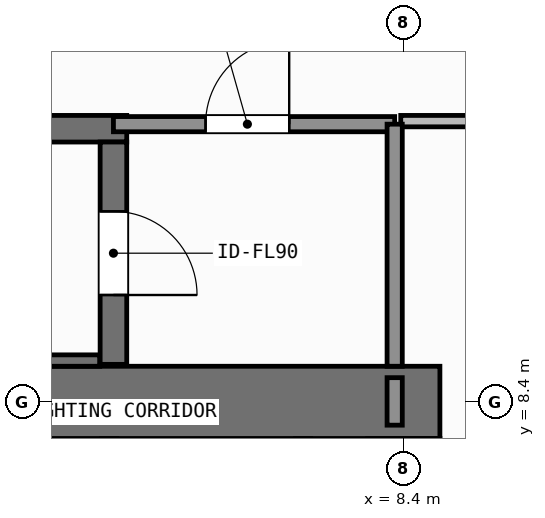
"""IFC4 building model, lengths in metres.
Left out: names, types, materials, properties, quantities, classifications, styles, units other than length and angle.
Written with IfcOpenShell. Run it as: python <this file> out.ifc"""

import sys

from ifc_helpers import new_model, si_unit, direction, frame, frame_2d, origin, place, context, subcontext, project, spatial, rectangle, extrude, element, fill, save


model = new_model("IFC4")
c1 = context("Model", 3, precision=1e-05, world=origin(), true_north=direction((0.0, 1.0)))
c2 = subcontext(c1, "Body", "Model", "MODEL_VIEW")
j1 = project(units=[si_unit("LENGTHUNIT", "METRE"), si_unit("PLANEANGLEUNIT", "RADIAN")], contexts=[c1])
p1 = place(None, origin())
s1 = spatial("IfcSite", under=j1, at=p1, CompositionType="ELEMENT")
p2 = place(p1, origin())
s2 = spatial("IfcBuilding", under=s1, at=p2, CompositionType="ELEMENT")
p3 = place(p2, frame((0.0, 0.0, 93.0)))
s3 = spatial("IfcBuildingStorey", under=s2, at=p3, CompositionType="ELEMENT", Elevation=93.0)
p4 = place(p3, frame((-7.55, 8.4, 0.0), z_axis=(0.0, 0.0, 1.0), x_axis=(1.0, 0.0, 0.0)))
e1 = element("IfcWall", 1, at=p4, inside=s3, PredefinedType="SHEAR", context=c2, shape_type="SweptSolid", body=[
    extrude(rectangle(XDim=16.425, YDim=0.95, at=frame_2d((8.212, 0.0))), origin(), (0.0, 0.0, 1.0), 3.9),
])
p5 = place(p3, frame((8.4, 5.825, 0.0), z_axis=(0.0, 0.0, 1.0), x_axis=(0.0, 1.0, 0.0)))
e2 = element("IfcWall", 2, at=p5, inside=s3, PredefinedType="SHEAR", context=c2, shape_type="SweptSolid", body=[
    extrude(rectangle(XDim=2.1, YDim=0.95, at=frame_2d((1.05, 0.0))), origin(), (0.0, 0.0, 1.0), 3.9),
])
p6 = place(p3, frame((-2.555, 12.0, 0.0), z_axis=(0.0, 0.0, 1.0), x_axis=(1.0, 0.0, 0.0)))
e3 = element("IfcWall", 3, at=p6, inside=s3, PredefinedType="SHEAR", context=c2, shape_type="SweptSolid", body=[
    extrude(rectangle(XDim=7.31, YDim=0.35, at=frame_2d((3.655, 0.0))), origin(), (0.0, 0.0, 1.0), 3.9),
])
p7 = place(p3, frame((-2.2, 8.95, 0.0), z_axis=(0.0, 0.0, 1.0), x_axis=(1.0, 0.0, 0.0)))
e4 = element("IfcWall", 4, at=p7, inside=s3, PredefinedType="SHEAR", context=c2, shape_type="SweptSolid", body=[
    extrude(rectangle(XDim=6.6, YDim=0.15, at=frame_2d((3.3, 0.0))), origin(), (0.0, 0.0, 1.0), 3.9),
])
p8 = place(p3, frame((4.58, 11.825, 0.0), z_axis=(0.0, 0.0, 1.0), x_axis=(0.0, -1.0, 0.0)))
e5 = element("IfcWall", 5, at=p8, inside=s3, PredefinedType="SHEAR", context=c2, shape_type="SweptSolid", body=[
    extrude(rectangle(XDim=2.925, YDim=0.35, at=frame_2d((1.462, 0.0))), origin(), (0.0, 0.0, 1.0), 3.9),
])
p9 = place(p8, frame((0.913, 0.0, 0.0)))
e6 = element("IfcOpeningElement", 6, at=p9, cuts=e5, PredefinedType="OPENING", context=c2, shape_type="SweptSolid", body=[
    extrude(rectangle(XDim=1.1, YDim=2.15, at=frame_2d((0.55, 1.075))), frame((0.0, 0.185, 0.0), z_axis=(0.0, -1.0, 0.0), x_axis=(1.0, 0.0, 0.0)), (0.0, 0.0, 1.0), 0.37),
])
p10 = place(p3, frame((4.525, 5.825, 0.0), z_axis=(0.0, 0.0, 1.0), x_axis=(0.0, 1.0, 0.0)))
e7 = element("IfcWall", 7, at=p10, inside=s3, PredefinedType="SHEAR", context=c2, shape_type="SweptSolid", body=[
    extrude(rectangle(XDim=2.1, YDim=0.2, at=frame_2d((1.05, 0.0))), origin(), (0.0, 0.0, 1.0), 3.68),
])
p11 = place(p10, frame((0.425, 0.0, 0.0)))
e8 = element("IfcOpeningElement", 8, at=p11, cuts=e7, PredefinedType="OPENING", context=c2, shape_type="SweptSolid", body=[
    extrude(rectangle(XDim=1.1, YDim=2.2, at=frame_2d((0.55, 1.1))), frame((0.0, 0.11, 0.0), z_axis=(0.0, -1.0, 0.0), x_axis=(1.0, 0.0, 0.0)), (0.0, 0.0, 1.0), 0.22),
])
p12 = place(p3, frame((7.075, 5.825, 0.0), z_axis=(0.0, 0.0, 1.0), x_axis=(0.0, 1.0, 0.0)))
e9 = element("IfcWall", 9, at=p12, inside=s3, PredefinedType="SHEAR", context=c2, shape_type="SweptSolid", body=[
    extrude(rectangle(XDim=2.1, YDim=0.2, at=frame_2d((1.05, 0.0))), origin(), (0.0, 0.0, 1.0), 3.68),
])
p13 = place(p3, frame((4.58, 12.06, 0.0), z_axis=(0.0, 0.0, 1.0), x_axis=(1.0, 0.0, 0.0)))
e10 = element("IfcWall", 10, at=p13, inside=s3, PredefinedType="SOLIDWALL", context=c2, shape_type="SweptSolid", body=[
    extrude(rectangle(XDim=3.7, YDim=0.2, at=frame_2d((1.85, 0.0))), origin(), (0.0, 0.0, 1.0), 3.68),
])
p14 = place(p13, frame((1.212, 0.0, 0.0)))
e11 = element("IfcOpeningElement", 11, at=p14, cuts=e10, PredefinedType="OPENING", context=c2, shape_type="SweptSolid", body=[
    extrude(rectangle(XDim=1.1, YDim=2.15, at=frame_2d((0.55, 1.075))), frame((0.0, 0.11, 0.0), z_axis=(0.0, -1.0, 0.0), x_axis=(1.0, 0.0, 0.0)), (0.0, 0.0, 1.0), 0.22),
])
p15 = place(p3, frame((8.36, 12.1, 0.0), z_axis=(0.0, 0.0, 1.0), x_axis=(1.0, 0.0, 0.0)))
e12 = element("IfcWall", 12, at=p15, inside=s3, PredefinedType="PARTITIONING", context=c2, shape_type="SweptSolid", body=[
    extrude(rectangle(XDim=7.22, YDim=0.15, at=frame_2d((3.61, 0.0))), origin(), (0.0, 0.0, 1.0), 3.68),
])
p16 = place(p15, frame((3.513, 0.0, 0.0)))
e13 = element("IfcOpeningElement", 13, at=p16, cuts=e12, PredefinedType="OPENING", context=c2, shape_type="SweptSolid", body=[
    extrude(rectangle(XDim=0.9, YDim=2.1, at=frame_2d((0.45, 1.05))), frame((0.0, 0.085, 0.0), z_axis=(0.0, -1.0, 0.0), x_axis=(1.0, 0.0, 0.0)), (0.0, 0.0, 1.0), 0.17),
])
p17 = place(p3, frame((8.28, 8.875, 0.0), z_axis=(0.0, 0.0, 1.0), x_axis=(0.0, 1.0, 0.0)))
e14 = element("IfcWall", 14, at=p17, inside=s3, PredefinedType="SOLIDWALL", context=c2, shape_type="SweptSolid", body=[
    extrude(rectangle(XDim=3.185, YDim=0.2, at=frame_2d((1.593, 0.0))), origin(), (0.0, 0.0, 1.0), 3.68),
])
p18 = place(p3, frame((8.28, 8.1, 0.0), z_axis=(0.0, 0.0, 1.0), x_axis=(0.0, 1.0, 0.0)))
e15 = element("IfcWall", 15, at=p18, inside=s3, PredefinedType="SOLIDWALL", context=c2, shape_type="SweptSolid", body=[
    extrude(rectangle(XDim=0.625, YDim=0.2, at=frame_2d((0.312, 0.0))), origin(), (0.0, 0.0, 1.0), 3.68),
])
p19 = place(p9, origin())
e16 = element("IfcDoor", 16, at=p19, inside=s3, OperationType="SINGLE_SWING_RIGHT", PredefinedType="DOOR", context=c2, shape_type="SweptSolid", body=[
    extrude(rectangle(XDim=1.1, YDim=2.15, at=frame_2d((0.55, 1.075))), frame((0.0, 0.025, 0.0), z_axis=(0.0, -1.0, 0.0), x_axis=(1.0, 0.0, 0.0)), (0.0, 0.0, 1.0), 0.05),
])
fill(e6, e16)
p20 = place(p14, origin())
e17 = element("IfcDoor", 17, at=p20, inside=s3, OperationType="SINGLE_SWING_RIGHT", PredefinedType="DOOR", context=c2, shape_type="SweptSolid", body=[
    extrude(rectangle(XDim=1.1, YDim=2.15, at=frame_2d((0.55, 1.075))), frame((0.0, 0.025, 0.0), z_axis=(0.0, -1.0, 0.0), x_axis=(1.0, 0.0, 0.0)), (0.0, 0.0, 1.0), 0.05),
])
fill(e11, e17)
save(model, sys.argv[1])
